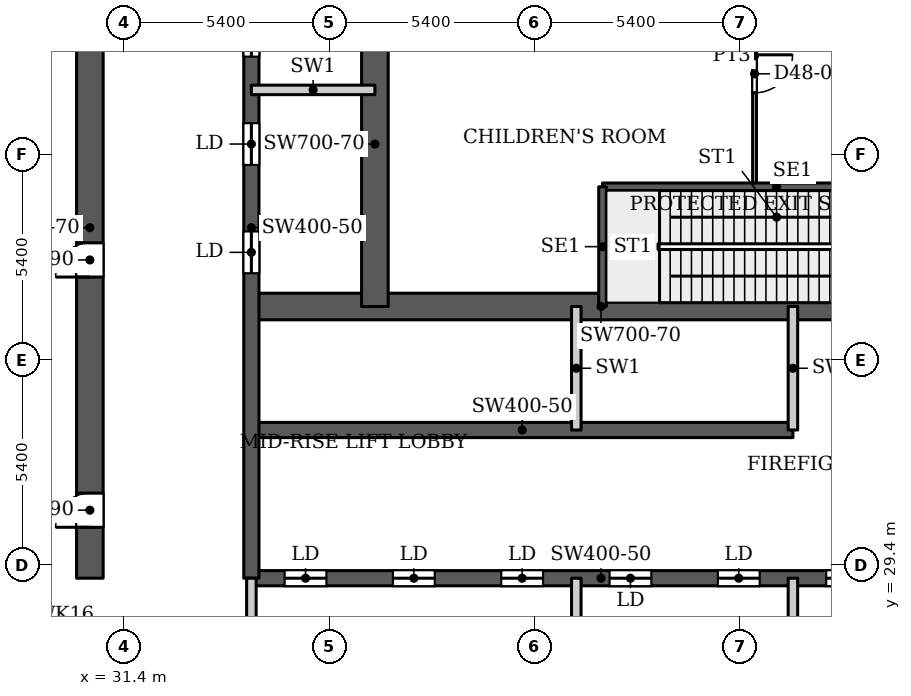
"""IFC4 building model, lengths in metres.
Left out: names, types, materials, properties, quantities, classifications, styles, units other than length and angle.
Written with IfcOpenShell. Run it as: python <this file> out.ifc"""

import sys

from ifc_helpers import new_model, si_unit, direction, frame, frame_2d, origin, place, context, subcontext, project, spatial, rectangle, extrude, source, transform, mapped, element, fill, save


model = new_model("IFC4")
c1 = context("Model", 3, precision=1e-05, world=origin(), true_north=direction((0.0, 1.0)))
c2 = subcontext(c1, "Body", "Model", "MODEL_VIEW")
j1 = project(units=[si_unit("LENGTHUNIT", "METRE"), si_unit("PLANEANGLEUNIT", "RADIAN")], contexts=[c1])
p1 = place(None, origin())
s1 = spatial("IfcSite", under=j1, at=p1, CompositionType="ELEMENT")
p2 = place(p1, origin())
s2 = spatial("IfcBuilding", under=s1, at=p2, CompositionType="ELEMENT")
p3 = place(p2, frame((0.0, 0.0, 203.3)))
s3 = spatial("IfcBuildingStorey", under=s2, at=p3, CompositionType="ELEMENT", Elevation=203.3)
p4 = place(p3, frame((34.75, 29.05, 0.0), z_axis=(0.0, 0.0, 1.0), x_axis=(1.0, 0.0, 0.0)))
e1 = element("IfcWall", 1, at=p4, inside=s3, PredefinedType="SHEAR", context=c2, shape_type="SweptSolid", body=[
    extrude(rectangle(XDim=18.4, YDim=0.4, at=frame_2d((9.2, 0.0))), origin(), (0.0, 0.0, 1.0), 7.8),
])
p5 = place(p4, frame((0.875, 0.0, 0.0)))
e2 = element("IfcOpeningElement", 2, at=p5, cuts=e1, PredefinedType="OPENING", context=c2, shape_type="SweptSolid", body=[
    extrude(rectangle(XDim=1.1, YDim=2.2, at=frame_2d((0.55, 1.1))), frame((0.0, 0.21, 0.0), z_axis=(0.0, -1.0, 0.0), x_axis=(1.0, 0.0, 0.0)), (0.0, 0.0, 1.0), 0.42),
])
p6 = place(p4, frame((3.725, 0.0, 0.0)))
e3 = element("IfcOpeningElement", 3, at=p6, cuts=e1, PredefinedType="OPENING", context=c2, shape_type="SweptSolid", body=[
    extrude(rectangle(XDim=1.1, YDim=2.2, at=frame_2d((0.55, 1.1))), frame((0.0, 0.21, 0.0), z_axis=(0.0, -1.0, 0.0), x_axis=(1.0, 0.0, 0.0)), (0.0, 0.0, 1.0), 0.42),
])
p7 = place(p4, frame((6.575, 0.0, 0.0)))
e4 = element("IfcOpeningElement", 4, at=p7, cuts=e1, PredefinedType="OPENING", context=c2, shape_type="SweptSolid", body=[
    extrude(rectangle(XDim=1.1, YDim=2.2, at=frame_2d((0.55, 1.1))), frame((0.0, 0.21, 0.0), z_axis=(0.0, -1.0, 0.0), x_axis=(1.0, 0.0, 0.0)), (0.0, 0.0, 1.0), 0.42),
])
p8 = place(p4, frame((9.425, 0.0, 0.0)))
e5 = element("IfcOpeningElement", 5, at=p8, cuts=e1, PredefinedType="OPENING", context=c2, shape_type="SweptSolid", body=[
    extrude(rectangle(XDim=1.1, YDim=2.2, at=frame_2d((0.55, 1.1))), frame((0.0, 0.21, 0.0), z_axis=(0.0, -1.0, 0.0), x_axis=(1.0, 0.0, 0.0)), (0.0, 0.0, 1.0), 0.42),
])
p9 = place(p4, frame((12.275, 0.0, 0.0)))
e6 = element("IfcOpeningElement", 6, at=p9, cuts=e1, PredefinedType="OPENING", context=c2, shape_type="SweptSolid", body=[
    extrude(rectangle(XDim=1.1, YDim=2.2, at=frame_2d((0.55, 1.1))), frame((0.0, 0.21, 0.0), z_axis=(0.0, -1.0, 0.0), x_axis=(1.0, 0.0, 0.0)), (0.0, 0.0, 1.0), 0.42),
])
p10 = place(p4, frame((15.125, 0.0, 0.0)))
e7 = element("IfcOpeningElement", 7, at=p10, cuts=e1, PredefinedType="OPENING", context=c2, shape_type="SweptSolid", body=[
    extrude(rectangle(XDim=1.1, YDim=2.2, at=frame_2d((0.55, 1.1))), frame((0.0, 0.21, 0.0), z_axis=(0.0, -1.0, 0.0), x_axis=(1.0, 0.0, 0.0)), (0.0, 0.0, 1.0), 0.42),
])
p11 = place(p3, frame((34.75, 32.95, 0.0), z_axis=(0.0, 0.0, 1.0), x_axis=(1.0, 0.0, 0.0)))
e8 = element("IfcWall", 8, at=p11, inside=s3, PredefinedType="SHEAR", context=c2, shape_type="SweptSolid", body=[
    extrude(rectangle(XDim=14.25, YDim=0.4, at=frame_2d((7.125, 0.0))), origin(), (0.0, 0.0, 1.0), 7.8),
])
p12 = place(p3, frame((34.75, 36.2, 0.0), z_axis=(0.0, 0.0, 1.0), x_axis=(1.0, 0.0, 0.0)))
e9 = element("IfcWall", 9, at=p12, inside=s3, PredefinedType="SHEAR", context=c2, shape_type="SweptSolid", body=[
    extrude(rectangle(XDim=18.4, YDim=0.7, at=frame_2d((9.2, 0.0))), origin(), (0.0, 0.0, 1.0), 7.8),
])
p13 = place(p12, frame((16.9, 0.0, 0.0)))
e10 = element("IfcOpeningElement", 10, at=p13, cuts=e9, PredefinedType="OPENING", context=c2, shape_type="SweptSolid", body=[
    extrude(rectangle(XDim=1.0, YDim=2.2, at=frame_2d((0.5, 1.1))), frame((0.0, 0.36, 0.0), z_axis=(0.0, -1.0, 0.0), x_axis=(1.0, 0.0, 0.0)), (0.0, 0.0, 1.0), 0.72),
])
p14 = place(p3, frame((34.75, 29.05, 0.0), z_axis=(0.0, 0.0, 1.0), x_axis=(0.0, 1.0, 0.0)))
e11 = element("IfcWall", 11, at=p14, inside=s3, PredefinedType="SHEAR", context=c2, shape_type="SweptSolid", body=[
    extrude(rectangle(XDim=18.45, YDim=0.4, at=frame_2d((9.225, 0.0))), origin(), (0.0, 0.0, 1.0), 7.8),
])
p15 = place(p14, frame((8.025, 0.0, 0.0)))
e12 = element("IfcOpeningElement", 12, at=p15, cuts=e11, PredefinedType="OPENING", context=c2, shape_type="SweptSolid", body=[
    extrude(rectangle(XDim=1.1, YDim=2.2, at=frame_2d((0.55, 1.1))), frame((0.0, 0.21, 0.0), z_axis=(0.0, -1.0, 0.0), x_axis=(1.0, 0.0, 0.0)), (0.0, 0.0, 1.0), 0.42),
])
p16 = place(p14, frame((10.875, 0.0, 0.0)))
e13 = element("IfcOpeningElement", 13, at=p16, cuts=e11, PredefinedType="OPENING", context=c2, shape_type="SweptSolid", body=[
    extrude(rectangle(XDim=1.1, YDim=2.2, at=frame_2d((0.55, 1.1))), frame((0.0, 0.21, 0.0), z_axis=(0.0, -1.0, 0.0), x_axis=(1.0, 0.0, 0.0)), (0.0, 0.0, 1.0), 0.42),
])
p17 = place(p14, frame((13.725, 0.0, 0.0)))
e14 = element("IfcOpeningElement", 14, at=p17, cuts=e11, PredefinedType="OPENING", context=c2, shape_type="SweptSolid", body=[
    extrude(rectangle(XDim=1.1, YDim=2.2, at=frame_2d((0.55, 1.1))), frame((0.0, 0.21, 0.0), z_axis=(0.0, -1.0, 0.0), x_axis=(1.0, 0.0, 0.0)), (0.0, 0.0, 1.0), 0.42),
])
p18 = place(p14, frame((15.95, 0.0, 0.0)))
e15 = element("IfcOpeningElement", 15, at=p18, cuts=e11, PredefinedType="OPENING", context=c2, shape_type="SweptSolid", body=[
    extrude(rectangle(XDim=1.1, YDim=2.2, at=frame_2d((0.55, 1.1))), frame((0.0, 0.21, 0.0), z_axis=(0.0, -1.0, 0.0), x_axis=(1.0, 0.0, 0.0)), (0.0, 0.0, 1.0), 0.42),
])
p19 = place(p3, frame((38.0, 36.2, 0.0), z_axis=(0.0, 0.0, 1.0), x_axis=(0.0, 1.0, 0.0)))
e16 = element("IfcWall", 16, at=p19, inside=s3, PredefinedType="SHEAR", context=c2, shape_type="SweptSolid", body=[
    extrude(rectangle(XDim=8.55, YDim=0.7, at=frame_2d((4.275, 0.0))), origin(), (0.0, 0.0, 1.0), 7.8),
])
p20 = place(p3, frame((30.5, 29.05, 0.0), z_axis=(0.0, 0.0, 1.0), x_axis=(0.0, 1.0, 0.0)))
e17 = element("IfcWall", 17, at=p20, inside=s3, PredefinedType="SHEAR", context=c2, shape_type="SweptSolid", body=[
    extrude(rectangle(XDim=18.45, YDim=0.7, at=frame_2d((9.225, 0.0))), origin(), (0.0, 0.0, 1.0), 7.8),
])
p21 = place(p20, frame((1.34, 0.0, 0.0)))
e18 = element("IfcOpeningElement", 18, at=p21, cuts=e17, PredefinedType="OPENING", context=c2, shape_type="SweptSolid", body=[
    extrude(rectangle(XDim=0.9, YDim=2.2, at=frame_2d((0.45, 1.1))), frame((0.0, 0.36, 0.0), z_axis=(0.0, -1.0, 0.0), x_axis=(1.0, 0.0, 0.0)), (0.0, 0.0, 1.0), 0.72),
])
p22 = place(p20, frame((7.925, 0.0, 0.0)))
e19 = element("IfcOpeningElement", 19, at=p22, cuts=e17, PredefinedType="OPENING", context=c2, shape_type="SweptSolid", body=[
    extrude(rectangle(XDim=0.9, YDim=2.2, at=frame_2d((0.45, 1.1))), frame((0.0, 0.36, 0.0), z_axis=(0.0, -1.0, 0.0), x_axis=(1.0, 0.0, 0.0)), (0.0, 0.0, 1.0), 0.72),
])
p23 = place(p3, frame((43.99, 39.35, 0.0), z_axis=(0.0, 0.0, 1.0), x_axis=(1.0, 0.0, 0.0)))
e20 = element("IfcWall", 20, at=p23, inside=s3, PredefinedType="SHEAR", context=c2, shape_type="SweptSolid", body=[
    extrude(rectangle(XDim=9.16, YDim=0.2, at=frame_2d((4.58, 0.0))), origin(), (0.0, 0.0, 1.0), 7.8),
])
p24 = place(p3, frame((43.99, 36.2, 0.0), z_axis=(0.0, 0.0, 1.0), x_axis=(0.0, 1.0, 0.0)))
e21 = element("IfcWall", 21, at=p24, inside=s3, PredefinedType="SHEAR", context=c2, shape_type="SweptSolid", body=[
    extrude(rectangle(XDim=3.15, YDim=0.2, at=frame_2d((1.575, 0.0))), origin(), (0.0, 0.0, 1.0), 7.8),
])
for number, where, z_axis, x_axis in (
    (22, (34.75, 25.8, 0.0), (0.0, 0.0, 1.0), (0.0, 1.0, 0.0)),
    (23, (43.3, 25.8, 0.0), (0.0, 0.0, 1.0), (0.0, 1.0, 0.0)),
    (24, (43.3, 32.95, 0.0), (0.0, 0.0, 1.0), (0.0, 1.0, 0.0)),
    (25, (49.0, 25.8, 0.0), (0.0, 0.0, 1.0), (0.0, 1.0, 0.0)),
    (26, (49.0, 32.95, 0.0), (0.0, 0.0, 1.0), (0.0, 1.0, 0.0)),
    (27, (34.75, 41.9, 0.0), (0.0, 0.0, 1.0), (1.0, 0.0, 0.0)),
):
    element("IfcWall", number, at=place(p3, frame(where, z_axis=z_axis, x_axis=x_axis)), inside=s3, PredefinedType="PARTITIONING", context=c2, shape_type="SweptSolid", body=[
        extrude(rectangle(XDim=3.25, YDim=0.25, at=frame_2d((1.625, 0.0))), origin(), (0.0, 0.0, 1.0), 7.8),
    ])
p25 = place(p3, frame((47.99, 39.449, 0.0), z_axis=(0.0, 0.0, 1.0), x_axis=(0.0, 1.0, 0.0)))
e28 = element("IfcWall", 28, at=p25, inside=s3, PredefinedType="PARTITIONING", context=c2, shape_type="SweptSolid", body=[
    extrude(rectangle(XDim=6.701, YDim=0.1, at=frame_2d((3.351, 0.0))), origin(), (0.0, 0.0, 1.0), 7.5),
])
p26 = place(p25, frame((2.374, 0.0, 0.0)))
e29 = element("IfcOpeningElement", 29, at=p26, cuts=e28, PredefinedType="OPENING", context=c2, shape_type="SweptSolid", body=[
    extrude(rectangle(XDim=1.0, YDim=2.1, at=frame_2d((0.5, 1.05))), frame((0.0, 0.06, 0.0), z_axis=(0.0, -1.0, 0.0), x_axis=(1.0, 0.0, 0.0)), (0.0, 0.0, 1.0), 0.12),
])
m1 = source(origin(), c2, "Body", "SweptSolid", [
    extrude(rectangle(XDim=1.1, YDim=2.2, at=frame_2d((0.55, 1.1))), frame((0.0, 0.025, 0.0), z_axis=(0.0, -1.0, 0.0), x_axis=(1.0, 0.0, 0.0)), (0.0, 0.0, 1.0), 0.05),
])
p27 = place(p5, origin())
e30 = element("IfcDoor", 30, at=p27, inside=s3, OperationType="SLIDING_TO_LEFT", PredefinedType="DOOR", context=c2, shape_type="MappedRepresentation", body=[
    mapped(m1, transform((0.0, 0.0, 0.0), x_axis=(1.0, 0.0, 0.0), y_axis=(0.0, 1.0, 0.0), z_axis=(0.0, 0.0, 1.0), scale=1.0)),
])
fill(e2, e30)
p28 = place(p6, origin())
e31 = element("IfcDoor", 31, at=p28, inside=s3, OperationType="SLIDING_TO_LEFT", PredefinedType="DOOR", context=c2, shape_type="MappedRepresentation", body=[
    mapped(m1, transform((0.0, 0.0, 0.0), x_axis=(1.0, 0.0, 0.0), y_axis=(0.0, 1.0, 0.0), z_axis=(0.0, 0.0, 1.0), scale=1.0)),
])
fill(e3, e31)
p29 = place(p7, origin())
e32 = element("IfcDoor", 32, at=p29, inside=s3, OperationType="SLIDING_TO_LEFT", PredefinedType="DOOR", context=c2, shape_type="MappedRepresentation", body=[
    mapped(m1, transform((0.0, 0.0, 0.0), x_axis=(1.0, 0.0, 0.0), y_axis=(0.0, 1.0, 0.0), z_axis=(0.0, 0.0, 1.0), scale=1.0)),
])
fill(e4, e32)
p30 = place(p8, origin())
e33 = element("IfcDoor", 33, at=p30, inside=s3, OperationType="SLIDING_TO_LEFT", PredefinedType="DOOR", context=c2, shape_type="MappedRepresentation", body=[
    mapped(m1, transform((0.0, 0.0, 0.0), x_axis=(1.0, 0.0, 0.0), y_axis=(0.0, 1.0, 0.0), z_axis=(0.0, 0.0, 1.0), scale=1.0)),
])
fill(e5, e33)
p31 = place(p9, origin())
e34 = element("IfcDoor", 34, at=p31, inside=s3, OperationType="SLIDING_TO_LEFT", PredefinedType="DOOR", context=c2, shape_type="MappedRepresentation", body=[
    mapped(m1, transform((0.0, 0.0, 0.0), x_axis=(1.0, 0.0, 0.0), y_axis=(0.0, 1.0, 0.0), z_axis=(0.0, 0.0, 1.0), scale=1.0)),
])
fill(e6, e34)
p32 = place(p15, origin())
e35 = element("IfcDoor", 35, at=p32, inside=s3, OperationType="SLIDING_TO_LEFT", PredefinedType="DOOR", context=c2, shape_type="MappedRepresentation", body=[
    mapped(m1, transform((0.0, 0.0, 0.0), x_axis=(1.0, 0.0, 0.0), y_axis=(0.0, 1.0, 0.0), z_axis=(0.0, 0.0, 1.0), scale=1.0)),
])
fill(e12, e35)
p33 = place(p16, origin())
e36 = element("IfcDoor", 36, at=p33, inside=s3, OperationType="SLIDING_TO_LEFT", PredefinedType="DOOR", context=c2, shape_type="MappedRepresentation", body=[
    mapped(m1, transform((0.0, 0.0, 0.0), x_axis=(1.0, 0.0, 0.0), y_axis=(0.0, 1.0, 0.0), z_axis=(0.0, 0.0, 1.0), scale=1.0)),
])
fill(e13, e36)
p34 = place(p17, origin())
e37 = element("IfcDoor", 37, at=p34, inside=s3, OperationType="SLIDING_TO_LEFT", PredefinedType="DOOR", context=c2, shape_type="MappedRepresentation", body=[
    mapped(m1, transform((0.0, 0.0, 0.0), x_axis=(1.0, 0.0, 0.0), y_axis=(0.0, 1.0, 0.0), z_axis=(0.0, 0.0, 1.0), scale=1.0)),
])
fill(e14, e37)
p35 = place(p10, origin())
e38 = element("IfcDoor", 38, at=p35, inside=s3, OperationType="SLIDING_TO_LEFT", PredefinedType="DOOR", context=c2, shape_type="MappedRepresentation", body=[
    mapped(m1, transform((0.0, 0.0, 0.0), x_axis=(1.0, 0.0, 0.0), y_axis=(0.0, 1.0, 0.0), z_axis=(0.0, 0.0, 1.0), scale=1.0)),
])
fill(e7, e38)
m2 = source(origin(), c2, "Body", "SweptSolid", [
    extrude(rectangle(XDim=0.9, YDim=2.2, at=frame_2d((0.45, 1.1))), frame((0.0, 0.025, 0.0), z_axis=(0.0, -1.0, 0.0), x_axis=(1.0, 0.0, 0.0)), (0.0, 0.0, 1.0), 0.05),
])
p36 = place(p21, origin())
e39 = element("IfcDoor", 39, at=p36, inside=s3, OperationType="SINGLE_SWING_LEFT", PredefinedType="DOOR", context=c2, shape_type="MappedRepresentation", body=[
    mapped(m2, transform((0.0, 0.0, 0.0), x_axis=(1.0, 0.0, 0.0), y_axis=(0.0, 1.0, 0.0), z_axis=(0.0, 0.0, 1.0), scale=1.0)),
])
fill(e18, e39)
p37 = place(p22, origin())
e40 = element("IfcDoor", 40, at=p37, inside=s3, OperationType="SINGLE_SWING_LEFT", PredefinedType="DOOR", context=c2, shape_type="MappedRepresentation", body=[
    mapped(m2, transform((0.0, 0.0, 0.0), x_axis=(1.0, 0.0, 0.0), y_axis=(0.0, 1.0, 0.0), z_axis=(0.0, 0.0, 1.0), scale=1.0)),
])
fill(e19, e40)
m3 = source(origin(), c2, "Body", "SweptSolid", [
    extrude(rectangle(XDim=1.0, YDim=2.1, at=frame_2d((0.5, 1.05))), frame((0.0, 0.025, 0.0), z_axis=(0.0, -1.0, 0.0), x_axis=(1.0, 0.0, 0.0)), (0.0, 0.0, 1.0), 0.05),
])
p38 = place(p26, origin())
e41 = element("IfcDoor", 41, at=p38, inside=s3, OperationType="SINGLE_SWING_RIGHT", PredefinedType="DOOR", context=c2, shape_type="MappedRepresentation", body=[
    mapped(m3, transform((0.0, 0.0, 0.0), x_axis=(1.0, 0.0, 0.0), y_axis=(0.0, 1.0, 0.0), z_axis=(0.0, 0.0, 1.0), scale=1.0)),
])
fill(e29, e41)
save(model, sys.argv[1])
